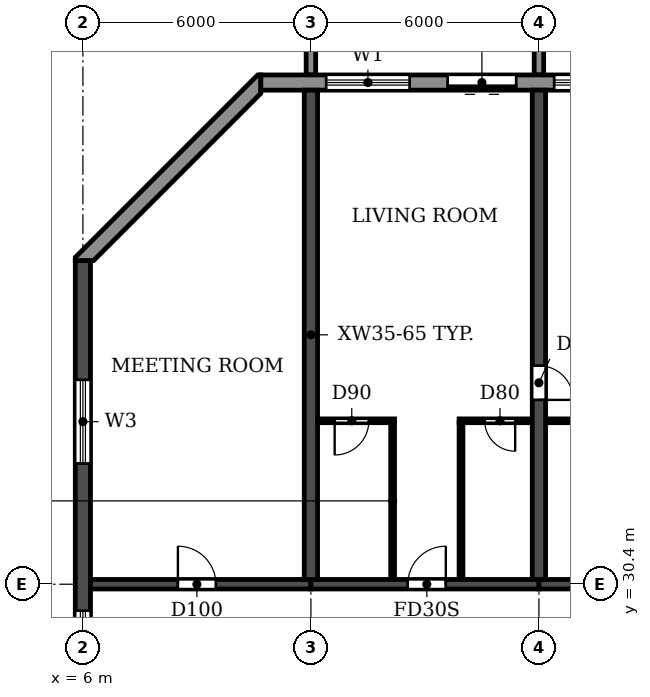
"""IFC4 building model, lengths in metres.
Left out: names, types, materials, properties, quantities, classifications, styles, units other than length and angle.
Written with IfcOpenShell. Run it as: python <this file> out.ifc"""

import sys

from ifc_helpers import new_model, si_unit, direction, frame, frame_2d, origin, place, context, subcontext, project, spatial, polyline, rectangle, outline, extrude, source, transform, mapped, element, fill, save


model = new_model("IFC4")
c1 = context("Model", 3, precision=1e-05, world=origin(), true_north=direction((0.0, 1.0)))
c2 = subcontext(c1, "Body", "Model", "MODEL_VIEW")
j1 = project(units=[si_unit("LENGTHUNIT", "METRE"), si_unit("PLANEANGLEUNIT", "RADIAN")], contexts=[c1])
p1 = place(None, origin())
s1 = spatial("IfcSite", under=j1, at=p1, CompositionType="ELEMENT")
p2 = place(p1, origin())
s2 = spatial("IfcBuilding", under=s1, at=p2, CompositionType="ELEMENT")
p3 = place(p2, frame((0.0, 0.0, 82.8)))
s3 = spatial("IfcBuildingStorey", under=s2, at=p3, CompositionType="ELEMENT", Elevation=82.8)
p4 = place(p3, frame((12.0, 30.525, 0.0), z_axis=(0.0, 0.0, 1.0), x_axis=(0.0, 1.0, 0.0)))
e1 = element("IfcWall", 1, at=p4, inside=s3, PredefinedType="SHEAR", context=c2, shape_type="SweptSolid", body=[
    extrude(rectangle(XDim=12.875, YDim=0.35, at=frame_2d((6.438, 0.0))), origin(), (0.0, 0.0, 1.0), 3.06),
])
p5 = place(p3, frame((18.0, 30.525, 0.0), z_axis=(0.0, 0.0, 1.0), x_axis=(0.0, 1.0, 0.0)))
e2 = element("IfcWall", 2, at=p5, inside=s3, PredefinedType="SHEAR", context=c2, shape_type="SweptSolid", body=[
    extrude(rectangle(XDim=12.875, YDim=0.35, at=frame_2d((6.438, 0.0))), origin(), (0.0, 0.0, 1.0), 3.06),
])
p6 = place(p5, frame((4.725, 0.0, 0.0)))
e3 = element("IfcOpeningElement", 3, at=p6, cuts=e2, PredefinedType="OPENING", context=c2, shape_type="SweptSolid", body=[
    extrude(rectangle(XDim=0.9, YDim=2.1, at=frame_2d((0.45, 1.05))), frame((0.0, 0.185, 0.0), z_axis=(0.0, -1.0, 0.0), x_axis=(1.0, 0.0, 0.0)), (0.0, 0.0, 1.0), 0.37),
])
p7 = place(p3, frame((6.0, 4.683, 0.0), z_axis=(0.0, 0.0, 1.0), x_axis=(0.0, 1.0, 0.0)))
e4 = element("IfcWall", 4, at=p7, inside=s3, PredefinedType="SHEAR", context=c2, shape_type="SweptSolid", body=[
    extrude(rectangle(XDim=34.234, YDim=0.4, at=frame_2d((17.117, 0.0))), origin(), (0.0, 0.0, 1.0), 3.06),
])
p8 = place(p7, frame((23.817, 0.0, 0.9)))
e5 = element("IfcOpeningElement", 5, at=p8, cuts=e4, PredefinedType="OPENING", context=c2, shape_type="SweptSolid", body=[
    extrude(rectangle(XDim=1.2, YDim=1.5, at=frame_2d((0.6, 0.75))), frame((0.0, 0.21, 0.0), z_axis=(0.0, -1.0, 0.0), x_axis=(1.0, 0.0, 0.0)), (0.0, 0.0, 1.0), 0.42),
])
p9 = place(p7, frame((8.017, 0.0, 0.9)))
e6 = element("IfcOpeningElement", 6, at=p9, cuts=e4, PredefinedType="OPENING", context=c2, shape_type="SweptSolid", body=[
    extrude(rectangle(XDim=1.2, YDim=1.5, at=frame_2d((0.6, 0.75))), frame((0.0, 0.21, 0.0), z_axis=(0.0, -1.0, 0.0), x_axis=(1.0, 0.0, 0.0)), (0.0, 0.0, 1.0), 0.42),
])
p10 = place(p7, frame((15.917, 0.0, 0.9)))
e7 = element("IfcOpeningElement", 7, at=p10, cuts=e4, PredefinedType="OPENING", context=c2, shape_type="SweptSolid", body=[
    extrude(rectangle(XDim=1.2, YDim=1.5, at=frame_2d((0.6, 0.75))), frame((0.0, 0.21, 0.0), z_axis=(0.0, -1.0, 0.0), x_axis=(1.0, 0.0, 0.0)), (0.0, 0.0, 1.0), 0.42),
])
p11 = place(p7, frame((28.894, 0.0, 0.6)))
e8 = element("IfcOpeningElement", 8, at=p11, cuts=e4, PredefinedType="OPENING", context=c2, shape_type="SweptSolid", body=[
    extrude(rectangle(XDim=2.2, YDim=1.8, at=frame_2d((1.1, 0.9))), frame((0.0, 0.21, 0.0), z_axis=(0.0, -1.0, 0.0), x_axis=(1.0, 0.0, 0.0)), (0.0, 0.0, 1.0), 0.42),
])
p12 = place(p7, frame((2.541, 0.0, 0.6)))
e9 = element("IfcOpeningElement", 9, at=p12, cuts=e4, PredefinedType="OPENING", context=c2, shape_type="SweptSolid", body=[
    extrude(rectangle(XDim=2.2, YDim=1.8, at=frame_2d((1.1, 0.9))), frame((0.0, 0.21, 0.0), z_axis=(0.0, -1.0, 0.0), x_axis=(1.0, 0.0, 0.0)), (0.0, 0.0, 1.0), 0.42),
])
p13 = place(p3, frame((6.2, 30.4, 0.0), z_axis=(0.0, 0.0, 1.0), x_axis=(1.0, 0.0, 0.0)))
e10 = element("IfcWall", 10, at=p13, inside=s3, PredefinedType="SHEAR", context=c2, shape_type="SweptSolid", body=[
    extrude(rectangle(XDim=5.8, YDim=0.25, at=frame_2d((2.9, 0.0))), origin(), (0.0, 0.0, 1.0), 2.46),
])
p14 = place(p13, frame((2.3, 0.0, 0.0)))
e11 = element("IfcOpeningElement", 11, at=p14, cuts=e10, PredefinedType="OPENING", context=c2, shape_type="SweptSolid", body=[
    extrude(rectangle(XDim=1.0, YDim=2.1, at=frame_2d((0.5, 1.05))), frame((0.0, 0.135, 0.0), z_axis=(0.0, -1.0, 0.0), x_axis=(1.0, 0.0, 0.0)), (0.0, 0.0, 1.0), 0.27),
])
p15 = place(p3, frame((12.0, 30.4, 0.0), z_axis=(0.0, 0.0, 1.0), x_axis=(1.0, 0.0, 0.0)))
e12 = element("IfcWall", 12, at=p15, inside=s3, PredefinedType="SHEAR", context=c2, shape_type="SweptSolid", body=[
    extrude(rectangle(XDim=6.0, YDim=0.25, at=frame_2d((3.0, 0.0))), origin(), (0.0, 0.0, 1.0), 2.46),
])
p16 = place(p15, frame((2.55, 0.0, 0.0)))
e13 = element("IfcOpeningElement", 13, at=p16, cuts=e12, PredefinedType="OPENING", context=c2, shape_type="SweptSolid", body=[
    extrude(rectangle(XDim=1.0, YDim=2.1, at=frame_2d((0.5, 1.05))), frame((0.0, 0.135, 0.0), z_axis=(0.0, -1.0, 0.0), x_axis=(1.0, 0.0, 0.0)), (0.0, 0.0, 1.0), 0.27),
])
p17 = place(p3, frame((18.0, 30.4, 0.0), z_axis=(0.0, 0.0, 1.0), x_axis=(1.0, 0.0, 0.0)))
e14 = element("IfcWall", 14, at=p17, inside=s3, PredefinedType="SHEAR", context=c2, shape_type="SweptSolid", body=[
    extrude(rectangle(XDim=6.0, YDim=0.25, at=frame_2d((3.0, 0.0))), origin(), (0.0, 0.0, 1.0), 2.46),
])
p18 = place(p3, frame((91.317, 43.6, 0.0), z_axis=(0.0, 0.0, 1.0), x_axis=(-1.0, 0.0, 0.0)))
e15 = element("IfcWall", 15, at=p18, inside=s3, PredefinedType="STANDARD", context=c2, shape_type="SweptSolid", body=[
    extrude(rectangle(XDim=80.634, YDim=0.4, at=frame_2d((40.317, 0.0))), origin(), (0.0, 0.0, 1.0), 3.06),
])
p19 = place(p18, frame((76.717, 0.0, 0.9)))
e16 = element("IfcOpeningElement", 16, at=p19, cuts=e15, PredefinedType="OPENING", context=c2, shape_type="SweptSolid", body=[
    extrude(rectangle(XDim=2.2, YDim=1.5, at=frame_2d((1.1, 0.75))), frame((0.0, 0.21, 0.0), z_axis=(0.0, -1.0, 0.0), x_axis=(1.0, 0.0, 0.0)), (0.0, 0.0, 1.0), 0.42),
])
p20 = place(p18, frame((73.917, 0.0, 0.0)))
e17 = element("IfcOpeningElement", 17, at=p20, cuts=e15, PredefinedType="OPENING", context=c2, shape_type="SweptSolid", body=[
    extrude(rectangle(XDim=1.8, YDim=2.4, at=frame_2d((0.9, 1.2))), frame((0.0, 0.21, 0.0), z_axis=(0.0, -1.0, 0.0), x_axis=(1.0, 0.0, 0.0)), (0.0, 0.0, 1.0), 0.42),
])
p21 = place(p18, frame((70.717, 0.0, 0.9)))
e18 = element("IfcOpeningElement", 18, at=p21, cuts=e15, PredefinedType="OPENING", context=c2, shape_type="SweptSolid", body=[
    extrude(rectangle(XDim=2.2, YDim=1.5, at=frame_2d((1.1, 0.75))), frame((0.0, 0.21, 0.0), z_axis=(0.0, -1.0, 0.0), x_axis=(1.0, 0.0, 0.0)), (0.0, 0.0, 1.0), 0.42),
])
p22 = place(p18, frame((67.717, 0.0, 0.9)))
e19 = element("IfcOpeningElement", 19, at=p22, cuts=e15, PredefinedType="OPENING", context=c2, shape_type="SweptSolid", body=[
    extrude(rectangle(XDim=2.2, YDim=1.5, at=frame_2d((1.1, 0.75))), frame((0.0, 0.21, 0.0), z_axis=(0.0, -1.0, 0.0), x_axis=(1.0, 0.0, 0.0)), (0.0, 0.0, 1.0), 0.42),
])
p23 = place(p18, frame((64.717, 0.0, 0.9)))
e20 = element("IfcOpeningElement", 20, at=p23, cuts=e15, PredefinedType="OPENING", context=c2, shape_type="SweptSolid", body=[
    extrude(rectangle(XDim=2.2, YDim=1.5, at=frame_2d((1.1, 0.75))), frame((0.0, 0.21, 0.0), z_axis=(0.0, -1.0, 0.0), x_axis=(1.0, 0.0, 0.0)), (0.0, 0.0, 1.0), 0.42),
])
p24 = place(p18, frame((61.917, 0.0, 0.0)))
e21 = element("IfcOpeningElement", 21, at=p24, cuts=e15, PredefinedType="OPENING", context=c2, shape_type="SweptSolid", body=[
    extrude(rectangle(XDim=1.8, YDim=2.4, at=frame_2d((0.9, 1.2))), frame((0.0, 0.21, 0.0), z_axis=(0.0, -1.0, 0.0), x_axis=(1.0, 0.0, 0.0)), (0.0, 0.0, 1.0), 0.42),
])
p25 = place(p18, frame((58.917, 0.0, 0.0)))
e22 = element("IfcOpeningElement", 22, at=p25, cuts=e15, PredefinedType="OPENING", context=c2, shape_type="SweptSolid", body=[
    extrude(rectangle(XDim=1.8, YDim=2.4, at=frame_2d((0.9, 1.2))), frame((0.0, 0.21, 0.0), z_axis=(0.0, -1.0, 0.0), x_axis=(1.0, 0.0, 0.0)), (0.0, 0.0, 1.0), 0.42),
])
p26 = place(p18, frame((55.717, 0.0, 0.9)))
e23 = element("IfcOpeningElement", 23, at=p26, cuts=e15, PredefinedType="OPENING", context=c2, shape_type="SweptSolid", body=[
    extrude(rectangle(XDim=2.2, YDim=1.5, at=frame_2d((1.1, 0.75))), frame((0.0, 0.21, 0.0), z_axis=(0.0, -1.0, 0.0), x_axis=(1.0, 0.0, 0.0)), (0.0, 0.0, 1.0), 0.42),
])
p27 = place(p18, frame((52.717, 0.0, 0.9)))
e24 = element("IfcOpeningElement", 24, at=p27, cuts=e15, PredefinedType="OPENING", context=c2, shape_type="SweptSolid", body=[
    extrude(rectangle(XDim=2.2, YDim=1.5, at=frame_2d((1.1, 0.75))), frame((0.0, 0.21, 0.0), z_axis=(0.0, -1.0, 0.0), x_axis=(1.0, 0.0, 0.0)), (0.0, 0.0, 1.0), 0.42),
])
p28 = place(p18, frame((49.917, 0.0, 0.0)))
e25 = element("IfcOpeningElement", 25, at=p28, cuts=e15, PredefinedType="OPENING", context=c2, shape_type="SweptSolid", body=[
    extrude(rectangle(XDim=1.8, YDim=2.4, at=frame_2d((0.9, 1.2))), frame((0.0, 0.21, 0.0), z_axis=(0.0, -1.0, 0.0), x_axis=(1.0, 0.0, 0.0)), (0.0, 0.0, 1.0), 0.42),
])
p29 = place(p18, frame((46.717, 0.0, 0.9)))
e26 = element("IfcOpeningElement", 26, at=p29, cuts=e15, PredefinedType="OPENING", context=c2, shape_type="SweptSolid", body=[
    extrude(rectangle(XDim=2.2, YDim=1.5, at=frame_2d((1.1, 0.75))), frame((0.0, 0.21, 0.0), z_axis=(0.0, -1.0, 0.0), x_axis=(1.0, 0.0, 0.0)), (0.0, 0.0, 1.0), 0.42),
])
p30 = place(p18, frame((43.717, 0.0, 0.9)))
e27 = element("IfcOpeningElement", 27, at=p30, cuts=e15, PredefinedType="OPENING", context=c2, shape_type="SweptSolid", body=[
    extrude(rectangle(XDim=2.2, YDim=1.5, at=frame_2d((1.1, 0.75))), frame((0.0, 0.21, 0.0), z_axis=(0.0, -1.0, 0.0), x_axis=(1.0, 0.0, 0.0)), (0.0, 0.0, 1.0), 0.42),
])
p31 = place(p18, frame((40.717, 0.0, 0.9)))
e28 = element("IfcOpeningElement", 28, at=p31, cuts=e15, PredefinedType="OPENING", context=c2, shape_type="SweptSolid", body=[
    extrude(rectangle(XDim=2.2, YDim=1.5, at=frame_2d((1.1, 0.75))), frame((0.0, 0.21, 0.0), z_axis=(0.0, -1.0, 0.0), x_axis=(1.0, 0.0, 0.0)), (0.0, 0.0, 1.0), 0.42),
])
p32 = place(p18, frame((37.917, 0.0, 0.0)))
e29 = element("IfcOpeningElement", 29, at=p32, cuts=e15, PredefinedType="OPENING", context=c2, shape_type="SweptSolid", body=[
    extrude(rectangle(XDim=1.8, YDim=2.4, at=frame_2d((0.9, 1.2))), frame((0.0, 0.21, 0.0), z_axis=(0.0, -1.0, 0.0), x_axis=(1.0, 0.0, 0.0)), (0.0, 0.0, 1.0), 0.42),
])
p33 = place(p18, frame((34.717, 0.0, 0.9)))
e30 = element("IfcOpeningElement", 30, at=p33, cuts=e15, PredefinedType="OPENING", context=c2, shape_type="SweptSolid", body=[
    extrude(rectangle(XDim=2.2, YDim=1.5, at=frame_2d((1.1, 0.75))), frame((0.0, 0.21, 0.0), z_axis=(0.0, -1.0, 0.0), x_axis=(1.0, 0.0, 0.0)), (0.0, 0.0, 1.0), 0.42),
])
p34 = place(p18, frame((31.717, 0.0, 0.9)))
e31 = element("IfcOpeningElement", 31, at=p34, cuts=e15, PredefinedType="OPENING", context=c2, shape_type="SweptSolid", body=[
    extrude(rectangle(XDim=2.2, YDim=1.5, at=frame_2d((1.1, 0.75))), frame((0.0, 0.21, 0.0), z_axis=(0.0, -1.0, 0.0), x_axis=(1.0, 0.0, 0.0)), (0.0, 0.0, 1.0), 0.42),
])
p35 = place(p18, frame((28.917, 0.0, 0.0)))
e32 = element("IfcOpeningElement", 32, at=p35, cuts=e15, PredefinedType="OPENING", context=c2, shape_type="SweptSolid", body=[
    extrude(rectangle(XDim=1.8, YDim=2.4, at=frame_2d((0.9, 1.2))), frame((0.0, 0.21, 0.0), z_axis=(0.0, -1.0, 0.0), x_axis=(1.0, 0.0, 0.0)), (0.0, 0.0, 1.0), 0.42),
])
p36 = place(p18, frame((25.717, 0.0, 0.9)))
e33 = element("IfcOpeningElement", 33, at=p36, cuts=e15, PredefinedType="OPENING", context=c2, shape_type="SweptSolid", body=[
    extrude(rectangle(XDim=2.2, YDim=1.5, at=frame_2d((1.1, 0.75))), frame((0.0, 0.21, 0.0), z_axis=(0.0, -1.0, 0.0), x_axis=(1.0, 0.0, 0.0)), (0.0, 0.0, 1.0), 0.42),
])
p37 = place(p18, frame((22.717, 0.0, 0.9)))
e34 = element("IfcOpeningElement", 34, at=p37, cuts=e15, PredefinedType="OPENING", context=c2, shape_type="SweptSolid", body=[
    extrude(rectangle(XDim=2.2, YDim=1.5, at=frame_2d((1.1, 0.75))), frame((0.0, 0.21, 0.0), z_axis=(0.0, -1.0, 0.0), x_axis=(1.0, 0.0, 0.0)), (0.0, 0.0, 1.0), 0.42),
])
p38 = place(p18, frame((19.717, 0.0, 0.9)))
e35 = element("IfcOpeningElement", 35, at=p38, cuts=e15, PredefinedType="OPENING", context=c2, shape_type="SweptSolid", body=[
    extrude(rectangle(XDim=2.2, YDim=1.5, at=frame_2d((1.1, 0.75))), frame((0.0, 0.21, 0.0), z_axis=(0.0, -1.0, 0.0), x_axis=(1.0, 0.0, 0.0)), (0.0, 0.0, 1.0), 0.42),
])
p39 = place(p18, frame((16.717, 0.0, 0.9)))
e36 = element("IfcOpeningElement", 36, at=p39, cuts=e15, PredefinedType="OPENING", context=c2, shape_type="SweptSolid", body=[
    extrude(rectangle(XDim=2.2, YDim=1.5, at=frame_2d((1.1, 0.75))), frame((0.0, 0.21, 0.0), z_axis=(0.0, -1.0, 0.0), x_axis=(1.0, 0.0, 0.0)), (0.0, 0.0, 1.0), 0.42),
])
p40 = place(p18, frame((13.917, 0.0, 0.0)))
e37 = element("IfcOpeningElement", 37, at=p40, cuts=e15, PredefinedType="OPENING", context=c2, shape_type="SweptSolid", body=[
    extrude(rectangle(XDim=1.8, YDim=2.4, at=frame_2d((0.9, 1.2))), frame((0.0, 0.21, 0.0), z_axis=(0.0, -1.0, 0.0), x_axis=(1.0, 0.0, 0.0)), (0.0, 0.0, 1.0), 0.42),
])
p41 = place(p18, frame((10.717, 0.0, 0.9)))
e38 = element("IfcOpeningElement", 38, at=p41, cuts=e15, PredefinedType="OPENING", context=c2, shape_type="SweptSolid", body=[
    extrude(rectangle(XDim=2.2, YDim=1.5, at=frame_2d((1.1, 0.75))), frame((0.0, 0.21, 0.0), z_axis=(0.0, -1.0, 0.0), x_axis=(1.0, 0.0, 0.0)), (0.0, 0.0, 1.0), 0.42),
])
p42 = place(p18, frame((7.717, 0.0, 0.9)))
e39 = element("IfcOpeningElement", 39, at=p42, cuts=e15, PredefinedType="OPENING", context=c2, shape_type="SweptSolid", body=[
    extrude(rectangle(XDim=2.2, YDim=1.5, at=frame_2d((1.1, 0.75))), frame((0.0, 0.21, 0.0), z_axis=(0.0, -1.0, 0.0), x_axis=(1.0, 0.0, 0.0)), (0.0, 0.0, 1.0), 0.42),
])
p43 = place(p18, frame((4.917, 0.0, 0.0)))
e40 = element("IfcOpeningElement", 40, at=p43, cuts=e15, PredefinedType="OPENING", context=c2, shape_type="SweptSolid", body=[
    extrude(rectangle(XDim=1.8, YDim=2.4, at=frame_2d((0.9, 1.2))), frame((0.0, 0.21, 0.0), z_axis=(0.0, -1.0, 0.0), x_axis=(1.0, 0.0, 0.0)), (0.0, 0.0, 1.0), 0.42),
])
p44 = place(p18, frame((1.717, 0.0, 0.9)))
e41 = element("IfcOpeningElement", 41, at=p44, cuts=e15, PredefinedType="OPENING", context=c2, shape_type="SweptSolid", body=[
    extrude(rectangle(XDim=2.2, YDim=1.5, at=frame_2d((1.1, 0.75))), frame((0.0, 0.21, 0.0), z_axis=(0.0, -1.0, 0.0), x_axis=(1.0, 0.0, 0.0)), (0.0, 0.0, 1.0), 0.42),
])
p45 = place(p3, origin())
e42 = element("IfcWall", 42, at=p45, inside=s3, PredefinedType="STANDARD", context=c2, shape_type="SweptSolid", body=[
    extrude(outline(polyline([(10.683, 43.8), (10.6, 43.8), (5.8, 39.0), (5.8, 38.917), (6.283, 38.917), (10.683, 43.317), (10.683, 43.8)])), origin(), (0.0, 0.0, 1.0), 3.06),
])
m1 = source(origin(), c2, "Body", "SweptSolid", [
    extrude(outline(polyline([(0.0, 0.0), (0.25, 0.0), (0.25, 3.1), (0.0, 3.1), (0.0, 0.0)])), origin(), (0.0, 0.0, 1.0), 3.1),
])
for number, where in (
    (43, (11.875, 43.8, 0.0)),
    (44, (17.875, 43.8, 0.0)),
):
    element("IfcWall", number, at=place(p3, frame(where)), inside=s3, PredefinedType="STANDARD", context=c2, shape_type="MappedRepresentation", body=[
        mapped(m1, transform((0.0, 0.0, 0.0))),
    ])
p46 = place(p3, frame((12.185, 34.7, 0.0), z_axis=(0.0, 0.0, 1.0), x_axis=(1.0, 0.0, 0.0)))
e45 = element("IfcWall", 45, at=p46, inside=s3, PredefinedType="PARTITIONING", context=c2, shape_type="SweptSolid", body=[
    extrude(rectangle(XDim=2.015, YDim=0.1, at=frame_2d((1.007, 0.0))), origin(), (0.0, 0.0, 1.0), 3.06),
])
p47 = place(p46, frame((0.44, 0.0, 0.0)))
e46 = element("IfcOpeningElement", 46, at=p47, cuts=e45, PredefinedType="OPENING", context=c2, shape_type="SweptSolid", body=[
    extrude(rectangle(XDim=0.9, YDim=2.1, at=frame_2d((0.45, 1.05))), frame((0.0, 0.06, 0.0), z_axis=(0.0, -1.0, 0.0), x_axis=(1.0, 0.0, 0.0)), (0.0, 0.0, 1.0), 0.12),
])
p48 = place(p3, frame((15.9, 34.7, 0.0), z_axis=(0.0, 0.0, 1.0), x_axis=(1.0, 0.0, 0.0)))
e47 = element("IfcWall", 47, at=p48, inside=s3, PredefinedType="PARTITIONING", context=c2, shape_type="SweptSolid", body=[
    extrude(rectangle(XDim=1.915, YDim=0.1, at=frame_2d((0.958, 0.0))), origin(), (0.0, 0.0, 1.0), 3.06),
])
p49 = place(p48, frame((0.675, 0.0, 0.0)))
e48 = element("IfcOpeningElement", 48, at=p49, cuts=e47, PredefinedType="OPENING", context=c2, shape_type="SweptSolid", body=[
    extrude(rectangle(XDim=0.8, YDim=2.1, at=frame_2d((0.4, 1.05))), frame((0.0, 0.06, 0.0), z_axis=(0.0, -1.0, 0.0), x_axis=(1.0, 0.0, 0.0)), (0.0, 0.0, 1.0), 0.12),
])
p50 = place(p3, frame((18.185, 34.7, 0.0), z_axis=(0.0, 0.0, 1.0), x_axis=(1.0, 0.0, 0.0)))
e49 = element("IfcWall", 49, at=p50, inside=s3, PredefinedType="PARTITIONING", context=c2, shape_type="SweptSolid", body=[
    extrude(rectangle(XDim=2.715, YDim=0.1, at=frame_2d((1.357, 0.0))), origin(), (0.0, 0.0, 1.0), 3.06),
])
p51 = place(p50, frame((0.915, 0.0, 0.0)))
e50 = element("IfcOpeningElement", 50, at=p51, cuts=e49, PredefinedType="OPENING", context=c2, shape_type="SweptSolid", body=[
    extrude(rectangle(XDim=0.8, YDim=2.1, at=frame_2d((0.4, 1.05))), frame((0.0, 0.06, 0.0), z_axis=(0.0, -1.0, 0.0), x_axis=(1.0, 0.0, 0.0)), (0.0, 0.0, 1.0), 0.12),
])
for number, where, z_axis, x_axis in (
    (51, (14.15, 30.535, 0.0), (0.0, 0.0, 1.0), (0.0, 1.0, 0.0)),
    (52, (15.95, 30.535, 0.0), (0.0, 0.0, 1.0), (0.0, 1.0, 0.0)),
):
    element("IfcWall", number, at=place(p3, frame(where, z_axis=z_axis, x_axis=x_axis)), inside=s3, PredefinedType="PARTITIONING", context=c2, shape_type="SweptSolid", body=[
        extrude(rectangle(XDim=4.115, YDim=0.1, at=frame_2d((2.058, 0.0))), origin(), (0.0, 0.0, 1.0), 3.06),
    ])
p52 = place(p19, origin())
e53 = element("IfcWindow", 53, at=p52, inside=s3, PartitioningType="DOUBLE_PANEL_HORIZONTAL", PredefinedType="WINDOW", context=c2, shape_type="SweptSolid", body=[
    extrude(rectangle(XDim=2.2, YDim=1.5, at=frame_2d((1.1, 0.75))), frame((0.0, 0.03, 0.0), z_axis=(0.0, -1.0, 0.0), x_axis=(1.0, 0.0, 0.0)), (0.0, 0.0, 1.0), 0.06),
])
fill(e16, e53)
p53 = place(p20, origin())
e54 = element("IfcDoor", 54, at=p53, inside=s3, OperationType="DOUBLE_DOOR_SLIDING", PredefinedType="DOOR", context=c2, shape_type="SweptSolid", body=[
    extrude(rectangle(XDim=1.8, YDim=2.4, at=frame_2d((0.9, 1.2))), frame((0.0, 0.025, 0.0), z_axis=(0.0, -1.0, 0.0), x_axis=(1.0, 0.0, 0.0)), (0.0, 0.0, 1.0), 0.05),
])
fill(e17, e54)
p54 = place(p21, origin())
e55 = element("IfcWindow", 55, at=p54, inside=s3, PartitioningType="DOUBLE_PANEL_HORIZONTAL", PredefinedType="WINDOW", context=c2, shape_type="SweptSolid", body=[
    extrude(rectangle(XDim=2.2, YDim=1.5, at=frame_2d((1.1, 0.75))), frame((0.0, 0.03, 0.0), z_axis=(0.0, -1.0, 0.0), x_axis=(1.0, 0.0, 0.0)), (0.0, 0.0, 1.0), 0.06),
])
fill(e18, e55)
p55 = place(p8, origin())
e56 = element("IfcWindow", 56, at=p55, inside=s3, PartitioningType="SINGLE_PANEL", PredefinedType="WINDOW", context=c2, shape_type="SweptSolid", body=[
    extrude(rectangle(XDim=1.2, YDim=1.5, at=frame_2d((0.6, 0.75))), frame((0.0, 0.03, 0.0), z_axis=(0.0, -1.0, 0.0), x_axis=(1.0, 0.0, 0.0)), (0.0, 0.0, 1.0), 0.06),
])
fill(e5, e56)
p56 = place(p11, origin())
e57 = element("IfcWindow", 57, at=p56, inside=s3, PartitioningType="DOUBLE_PANEL_HORIZONTAL", PredefinedType="WINDOW", context=c2, shape_type="SweptSolid", body=[
    extrude(rectangle(XDim=2.2, YDim=1.8, at=frame_2d((1.1, 0.9))), frame((0.0, 0.03, 0.0), z_axis=(0.0, -1.0, 0.0), x_axis=(1.0, 0.0, 0.0)), (0.0, 0.0, 1.0), 0.06),
])
fill(e8, e57)
p57 = place(p14, origin())
e58 = element("IfcDoor", 58, at=p57, inside=s3, OperationType="SINGLE_SWING_LEFT", PredefinedType="DOOR", context=c2, shape_type="SweptSolid", body=[
    extrude(rectangle(XDim=1.0, YDim=2.1, at=frame_2d((0.5, 1.05))), frame((0.0, 0.025, 0.0), z_axis=(0.0, -1.0, 0.0), x_axis=(1.0, 0.0, 0.0)), (0.0, 0.0, 1.0), 0.05),
])
fill(e11, e58)
p58 = place(p47, frame((0.9, 0.0, 0.0), z_axis=(0.0, 0.0, 1.0), x_axis=(-1.0, 0.0, 0.0)))
e59 = element("IfcDoor", 59, at=p58, inside=s3, OperationType="SINGLE_SWING_RIGHT", PredefinedType="DOOR", context=c2, shape_type="SweptSolid", body=[
    extrude(rectangle(XDim=0.9, YDim=2.1, at=frame_2d((0.45, 1.05))), frame((0.0, 0.025, 0.0), z_axis=(0.0, -1.0, 0.0), x_axis=(1.0, 0.0, 0.0)), (0.0, 0.0, 1.0), 0.05),
])
fill(e46, e59)
p59 = place(p16, origin())
e60 = element("IfcDoor", 60, at=p59, inside=s3, OperationType="SINGLE_SWING_RIGHT", PredefinedType="DOOR", context=c2, shape_type="SweptSolid", body=[
    extrude(rectangle(XDim=1.0, YDim=2.1, at=frame_2d((0.5, 1.05))), frame((0.0, 0.025, 0.0), z_axis=(0.0, -1.0, 0.0), x_axis=(1.0, 0.0, 0.0)), (0.0, 0.0, 1.0), 0.05),
])
fill(e13, e60)
p60 = place(p49, frame((0.8, 0.0, 0.0), z_axis=(0.0, 0.0, 1.0), x_axis=(-1.0, 0.0, 0.0)))
e61 = element("IfcDoor", 61, at=p60, inside=s3, OperationType="SINGLE_SWING_LEFT", PredefinedType="DOOR", context=c2, shape_type="SweptSolid", body=[
    extrude(rectangle(XDim=0.8, YDim=2.1, at=frame_2d((0.4, 1.05))), frame((0.0, 0.025, 0.0), z_axis=(0.0, -1.0, 0.0), x_axis=(1.0, 0.0, 0.0)), (0.0, 0.0, 1.0), 0.05),
])
fill(e48, e61)
p61 = place(p6, frame((0.9, 0.0, 0.0), z_axis=(0.0, 0.0, 1.0), x_axis=(-1.0, 0.0, 0.0)))
e62 = element("IfcDoor", 62, at=p61, inside=s3, OperationType="SINGLE_SWING_RIGHT", PredefinedType="DOOR", context=c2, shape_type="SweptSolid", body=[
    extrude(rectangle(XDim=0.9, YDim=2.1, at=frame_2d((0.45, 1.05))), frame((0.0, 0.025, 0.0), z_axis=(0.0, -1.0, 0.0), x_axis=(1.0, 0.0, 0.0)), (0.0, 0.0, 1.0), 0.05),
])
fill(e3, e62)
save(model, sys.argv[1])
